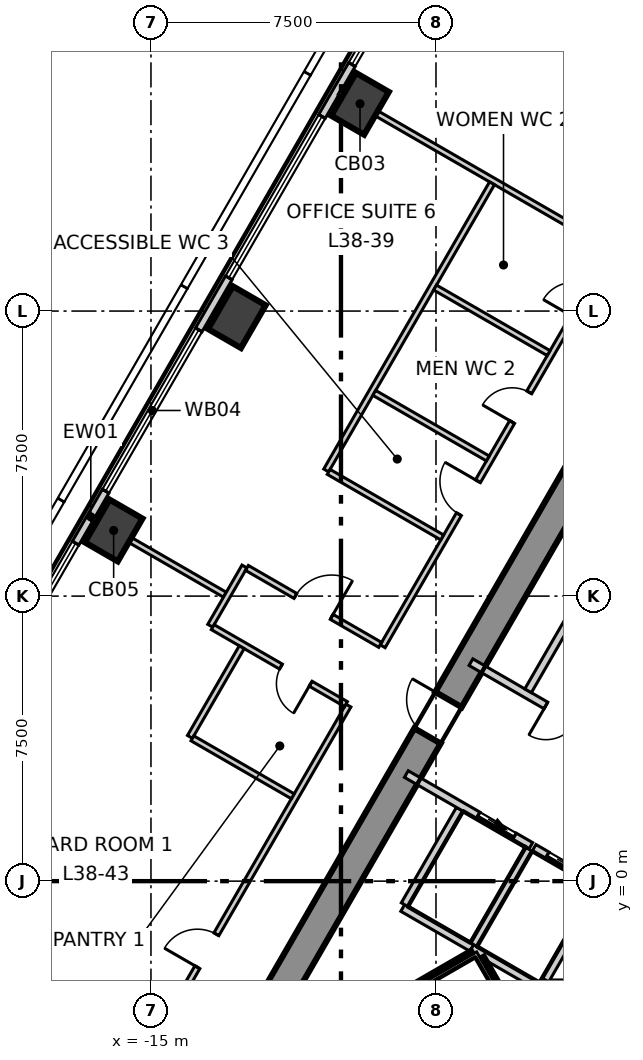
"""IFC4 building model, lengths in metres.
Left out: names, types, materials, properties, quantities, classifications, styles, units other than length and angle.
Written with IfcOpenShell. Run it as: python <this file> out.ifc"""

import sys

from ifc_helpers import new_model, si_unit, direction, frame, frame_2d, origin, origin_2d, place, context, subcontext, project, spatial, polyline, rectangle, outline, extrude, element, fill, save


model = new_model("IFC4")
c1 = context("Model", 3, precision=1e-05, world=origin(), true_north=direction((0.0, 1.0)))
c2 = subcontext(c1, "Body", "Model", "MODEL_VIEW")
j1 = project(units=[si_unit("LENGTHUNIT", "METRE"), si_unit("PLANEANGLEUNIT", "RADIAN")], contexts=[c1])
p1 = place(None, origin())
s1 = spatial("IfcSite", under=j1, at=p1, CompositionType="ELEMENT")
p2 = place(p1, origin())
s2 = spatial("IfcBuilding", under=s1, at=p2, CompositionType="ELEMENT")
p3 = place(p2, frame((0.0, 0.0, 164.3)))
s3 = spatial("IfcBuildingStorey", under=s2, at=p3, CompositionType="ELEMENT", Elevation=164.3)
p4 = place(p3, frame((-1.674, 14.3, -0.3), z_axis=(0.0, 0.0, 1.0), x_axis=(-0.499995765644, -0.866027848477, 0.0)))
e1 = element("IfcWall", 1, at=p4, inside=s3, PredefinedType="SHEAR", context=c2, shape_type="SweptSolid", body=[
    extrude(outline(polyline([(-0.231, -0.4), (1.732, -0.4), (3.695, -0.4), (5.658, -0.4), (7.621, -0.4), (9.584, -0.4), (11.547, -0.4), (13.51, -0.4), (15.473, -0.4), (17.436, -0.4), (19.399, -0.4), (21.362, -0.4), (23.325, -0.4), (22.863, 0.4), (20.977, 0.4), (19.091, 0.4), (17.205, 0.4), (15.319, 0.4), (13.433, 0.4), (11.547, 0.4), (9.661, 0.4), (7.775, 0.4), (5.889, 0.4), (4.003, 0.4), (2.117, 0.4), (0.231, 0.4), (-0.231, -0.4)])), origin(), (0.0, 0.0, 1.0), 4.0),
])
p5 = place(p4, frame((10.997, 0.0, 0.3)))
e2 = element("IfcOpeningElement", 2, at=p5, cuts=e1, PredefinedType="OPENING", context=c2, shape_type="SweptSolid", body=[
    extrude(rectangle(XDim=1.1, YDim=2.1, at=frame_2d((0.55, 1.05))), frame((0.0, 0.41, 0.0), z_axis=(0.0, -1.0, 0.0), x_axis=(1.0, 0.0, 0.0)), (0.0, 0.0, 1.0), 0.82),
])
for number, where, z_axis, x_axis in (
    (3, (-9.499, 20.454, -0.3), (0.0, 0.0, 1.0), (0.5, 0.866, 0.0)),
    (4, (-12.74, 14.841, -0.3), (0.0, 0.0, 1.0), (0.5, 0.866, 0.0)),
    (5, (-15.982, 9.227, -0.3), (0.0, 0.0, 1.0), (0.5, 0.866, 0.0)),
):
    element("IfcColumn", number, at=place(p3, frame(where, z_axis=z_axis, x_axis=x_axis)), inside=s3, PredefinedType="COLUMN", context=c2, shape_type="SweptSolid", body=[
        extrude(rectangle(XDim=1.3, YDim=1.0, at=origin_2d()), origin(), (0.0, 0.0, 1.0), 4.0),
    ])
p6 = place(p3, frame((-2.972, 33.16, 0.0), z_axis=(0.0, 0.0, 1.0), x_axis=(-0.500009959561, -0.866019653553, 0.0)))
e6 = element("IfcWall", 6, at=p6, inside=s3, PredefinedType="ELEMENTEDWALL", context=c2, shape_type="SweptSolid", body=[
    extrude(rectangle(XDim=54.443, YDim=0.2, at=frame_2d((27.222, 0.0))), origin(), (0.0, 0.0, 1.0), 3.7),
])
p7 = place(p6, frame((2.094, 0.0, 0.9)))
e7 = element("IfcOpeningElement", 7, at=p7, cuts=e6, PredefinedType="OPENING", context=c2, shape_type="SweptSolid", body=[
    extrude(rectangle(XDim=4.9, YDim=2.5, at=frame_2d((2.45, 1.25))), frame((0.0, 0.11, 0.0), z_axis=(0.0, -1.0, 0.0), x_axis=(1.0, 0.0, 0.0)), (0.0, 0.0, 1.0), 0.22),
])
p8 = place(p6, frame((8.576, 0.0, 0.9)))
e8 = element("IfcOpeningElement", 8, at=p8, cuts=e6, PredefinedType="OPENING", context=c2, shape_type="SweptSolid", body=[
    extrude(rectangle(XDim=4.9, YDim=2.5, at=frame_2d((2.45, 1.25))), frame((0.0, 0.11, 0.0), z_axis=(0.0, -1.0, 0.0), x_axis=(1.0, 0.0, 0.0)), (0.0, 0.0, 1.0), 0.22),
])
p9 = place(p6, frame((15.058, 0.0, 0.9)))
e9 = element("IfcOpeningElement", 9, at=p9, cuts=e6, PredefinedType="OPENING", context=c2, shape_type="SweptSolid", body=[
    extrude(rectangle(XDim=4.9, YDim=2.5, at=frame_2d((2.45, 1.25))), frame((0.0, 0.11, 0.0), z_axis=(0.0, -1.0, 0.0), x_axis=(1.0, 0.0, 0.0)), (0.0, 0.0, 1.0), 0.22),
])
p10 = place(p6, frame((21.54, 0.0, 0.9)))
e10 = element("IfcOpeningElement", 10, at=p10, cuts=e6, PredefinedType="OPENING", context=c2, shape_type="SweptSolid", body=[
    extrude(rectangle(XDim=4.9, YDim=2.5, at=frame_2d((2.45, 1.25))), frame((0.0, 0.11, 0.0), z_axis=(0.0, -1.0, 0.0), x_axis=(1.0, 0.0, 0.0)), (0.0, 0.0, 1.0), 0.22),
])
p11 = place(p6, frame((28.022, 0.0, 0.9)))
e11 = element("IfcOpeningElement", 11, at=p11, cuts=e6, PredefinedType="OPENING", context=c2, shape_type="SweptSolid", body=[
    extrude(rectangle(XDim=4.9, YDim=2.5, at=frame_2d((2.45, 1.25))), frame((0.0, 0.11, 0.0), z_axis=(0.0, -1.0, 0.0), x_axis=(1.0, 0.0, 0.0)), (0.0, 0.0, 1.0), 0.22),
])
p12 = place(p6, frame((34.505, 0.0, 0.9)))
e12 = element("IfcOpeningElement", 12, at=p12, cuts=e6, PredefinedType="OPENING", context=c2, shape_type="SweptSolid", body=[
    extrude(rectangle(XDim=4.9, YDim=2.5, at=frame_2d((2.45, 1.25))), frame((0.0, 0.11, 0.0), z_axis=(0.0, -1.0, 0.0), x_axis=(1.0, 0.0, 0.0)), (0.0, 0.0, 1.0), 0.22),
])
p13 = place(p6, frame((40.987, 0.0, 0.9)))
e13 = element("IfcOpeningElement", 13, at=p13, cuts=e6, PredefinedType="OPENING", context=c2, shape_type="SweptSolid", body=[
    extrude(rectangle(XDim=4.9, YDim=2.5, at=frame_2d((2.45, 1.25))), frame((0.0, 0.11, 0.0), z_axis=(0.0, -1.0, 0.0), x_axis=(1.0, 0.0, 0.0)), (0.0, 0.0, 1.0), 0.22),
])
p14 = place(p6, frame((47.469, 0.0, 0.9)))
e14 = element("IfcOpeningElement", 14, at=p14, cuts=e6, PredefinedType="OPENING", context=c2, shape_type="SweptSolid", body=[
    extrude(rectangle(XDim=4.9, YDim=2.5, at=frame_2d((2.45, 1.25))), frame((0.0, 0.11, 0.0), z_axis=(0.0, -1.0, 0.0), x_axis=(1.0, 0.0, 0.0)), (0.0, 0.0, 1.0), 0.22),
])
p15 = place(p3, frame((-23.001, -1.69, 0.0), z_axis=(0.0, 0.0, 1.0), x_axis=(0.866010060309, -0.500026574738, 0.0)))
e15 = element("IfcWall", 15, at=p15, inside=s3, PredefinedType="PARTITIONING", context=c2, shape_type="SweptSolid", body=[
    extrude(rectangle(XDim=8.2, YDim=0.15, at=frame_2d((4.1, 0.0))), origin(), (0.0, 0.0, 1.0), 3.7),
])
p16 = place(p3, frame((-18.631, -10.669, 0.0), z_axis=(0.0, 0.0, 1.0), x_axis=(0.500000173646, 0.86602530353, 0.0)))
e16 = element("IfcWall", 16, at=p16, inside=s3, PredefinedType="PARTITIONING", context=c2, shape_type="SweptSolid", body=[
    extrude(rectangle(XDim=17.654, YDim=0.15, at=frame_2d((8.827, 0.0))), origin(), (0.0, 0.0, 1.0), 3.7),
])
p17 = place(p16, frame((9.705, 0.0, 0.0)))
e17 = element("IfcOpeningElement", 17, at=p17, cuts=e16, PredefinedType="OPENING", context=c2, shape_type="SweptSolid", body=[
    extrude(rectangle(XDim=1.0, YDim=2.1, at=frame_2d((0.5, 1.05))), frame((0.0, 0.085, 0.0), z_axis=(0.0, -1.0, 0.0), x_axis=(1.0, 0.0, 0.0)), (0.0, 0.0, 1.0), 0.17),
])
p18 = place(p16, frame((2.141, 0.0, 0.0)))
e18 = element("IfcOpeningElement", 18, at=p18, cuts=e16, PredefinedType="OPENING", context=c2, shape_type="SweptSolid", body=[
    extrude(rectangle(XDim=1.1, YDim=2.1, at=frame_2d((0.55, 1.05))), frame((0.0, 0.085, 0.0), z_axis=(0.0, -1.0, 0.0), x_axis=(1.0, 0.0, 0.0)), (0.0, 0.0, 1.0), 0.17),
])
p19 = place(p3, frame((-8.903, 6.18, 0.0), z_axis=(0.0, 0.0, 1.0), x_axis=(0.500010074151, 0.866019587393, 0.0)))
e19 = element("IfcWall", 19, at=p19, inside=s3, PredefinedType="PARTITIONING", context=c2, shape_type="SweptSolid", body=[
    extrude(rectangle(XDim=17.806, YDim=0.15, at=frame_2d((8.903, 0.0))), origin(), (0.0, 0.0, 1.0), 3.7),
])
p20 = place(p19, frame((14.356, 0.0, 0.0)))
e20 = element("IfcOpeningElement", 20, at=p20, cuts=e19, PredefinedType="OPENING", context=c2, shape_type="SweptSolid", body=[
    extrude(rectangle(XDim=1.1, YDim=2.1, at=frame_2d((0.55, 1.05))), frame((0.0, 0.085, 0.0), z_axis=(0.0, -1.0, 0.0), x_axis=(1.0, 0.0, 0.0)), (0.0, 0.0, 1.0), 0.17),
])
p21 = place(p19, frame((10.014, 0.0, 0.0)))
e21 = element("IfcOpeningElement", 21, at=p21, cuts=e19, PredefinedType="OPENING", context=c2, shape_type="SweptSolid", body=[
    extrude(rectangle(XDim=0.9, YDim=2.1, at=frame_2d((0.45, 1.05))), frame((0.0, 0.085, 0.0), z_axis=(0.0, -1.0, 0.0), x_axis=(1.0, 0.0, 0.0)), (0.0, 0.0, 1.0), 0.17),
])
p22 = place(p19, frame((6.814, 0.0, 0.0)))
e22 = element("IfcOpeningElement", 22, at=p22, cuts=e19, PredefinedType="OPENING", context=c2, shape_type="SweptSolid", body=[
    extrude(rectangle(XDim=0.9, YDim=2.1, at=frame_2d((0.45, 1.05))), frame((0.0, 0.085, 0.0), z_axis=(0.0, -1.0, 0.0), x_axis=(1.0, 0.0, 0.0)), (0.0, 0.0, 1.0), 0.17),
])
p23 = place(p19, frame((4.014, 0.0, 0.0)))
e23 = element("IfcOpeningElement", 23, at=p23, cuts=e19, PredefinedType="OPENING", context=c2, shape_type="SweptSolid", body=[
    extrude(rectangle(XDim=1.0, YDim=2.1, at=frame_2d((0.5, 1.05))), frame((0.0, 0.085, 0.0), z_axis=(0.0, -1.0, 0.0), x_axis=(1.0, 0.0, 0.0)), (0.0, 0.0, 1.0), 0.17),
])
p24 = place(p3, frame((-16.519, 9.537, 0.0), z_axis=(0.0, 0.0, 1.0), x_axis=(0.866026010844, -0.49999894854, 0.0)))
e24 = element("IfcWall", 24, at=p24, inside=s3, PredefinedType="PARTITIONING", context=c2, shape_type="SweptSolid", body=[
    extrude(rectangle(XDim=4.0, YDim=0.15, at=frame_2d((2.0, 0.0))), origin(), (0.0, 0.0, 1.0), 3.2),
])
p25 = place(p3, frame((-13.44, 6.72, 0.0), z_axis=(0.0, 0.0, 1.0), x_axis=(0.499902469156, 0.866081705922, 0.0)))
e25 = element("IfcWall", 25, at=p25, inside=s3, PredefinedType="PARTITIONING", context=c2, shape_type="SweptSolid", body=[
    extrude(rectangle(XDim=1.8, YDim=0.15, at=frame_2d((0.9, 0.0))), origin(), (0.0, 0.0, 1.0), 3.7),
])
p26 = place(p3, frame((-12.475, 8.242, 0.0), z_axis=(0.0, 0.0, 1.0), x_axis=(0.865955608197, -0.500120870022, 0.0)))
e26 = element("IfcWall", 26, at=p26, inside=s3, PredefinedType="PARTITIONING", context=c2, shape_type="SweptSolid", body=[
    extrude(rectangle(XDim=4.049, YDim=0.15, at=frame_2d((2.024, 0.0))), origin(), (0.0, 0.0, 1.0), 3.7),
])
p27 = place(p26, frame((1.475, 0.0, 0.0)))
e27 = element("IfcOpeningElement", 27, at=p27, cuts=e26, PredefinedType="OPENING", context=c2, shape_type="SweptSolid", body=[
    extrude(rectangle(XDim=1.1, YDim=2.1, at=frame_2d((0.55, 1.05))), frame((0.0, 0.085, 0.0), z_axis=(0.0, -1.0, 0.0), x_axis=(1.0, 0.0, 0.0)), (0.0, 0.0, 1.0), 0.17),
])
p28 = place(p3, frame((-13.375, 6.683, 0.0), z_axis=(0.0, 0.0, 1.0), x_axis=(0.865929493314, -0.500166085025, 0.0)))
e28 = element("IfcWall", 28, at=p28, inside=s3, PredefinedType="PARTITIONING", context=c2, shape_type="SweptSolid", body=[
    extrude(rectangle(XDim=4.049, YDim=0.15, at=frame_2d((2.024, 0.0))), origin(), (0.0, 0.0, 1.0), 3.7),
])
p29 = place(p28, frame((2.075, 0.0, 0.0)))
e29 = element("IfcOpeningElement", 29, at=p29, cuts=e28, PredefinedType="OPENING", context=c2, shape_type="SweptSolid", body=[
    extrude(rectangle(XDim=0.9, YDim=2.1, at=frame_2d((0.45, 1.05))), frame((0.0, 0.085, 0.0), z_axis=(0.0, -1.0, 0.0), x_axis=(1.0, 0.0, 0.0)), (0.0, 0.0, 1.0), 0.17),
])
p30 = place(p3, frame((-13.974, 3.796, 0.0), z_axis=(0.0, 0.0, 1.0), x_axis=(0.500004325324, 0.866022906543, 0.0)))
e30 = element("IfcWall", 30, at=p30, inside=s3, PredefinedType="PARTITIONING", context=c2, shape_type="SweptSolid", body=[
    extrude(rectangle(XDim=2.724, YDim=0.15, at=frame_2d((1.362, 0.0))), origin(), (0.0, 0.0, 1.0), 3.7),
])
p31 = place(p3, frame((-13.909, 3.758, 0.0), z_axis=(0.0, 0.0, 1.0), x_axis=(0.865962925632, -0.500108199725, 0.0)))
e31 = element("IfcWall", 31, at=p31, inside=s3, PredefinedType="PARTITIONING", context=c2, shape_type="SweptSolid", body=[
    extrude(rectangle(XDim=3.05, YDim=0.15, at=frame_2d((1.525, 0.0))), origin(), (0.0, 0.0, 1.0), 3.7),
])
p32 = place(p3, frame((-10.036, 20.764, 0.0), z_axis=(0.0, 0.0, 1.0), x_axis=(0.866037308103, -0.499979380549, 0.0)))
e32 = element("IfcWall", 32, at=p32, inside=s3, PredefinedType="PARTITIONING", context=c2, shape_type="SweptSolid", body=[
    extrude(rectangle(XDim=8.198, YDim=0.15, at=frame_2d((4.099, 0.0))), origin(), (0.0, 0.0, 1.0), 3.7),
])
p33 = place(p3, frame((-10.389, 10.806, 0.0), z_axis=(0.0, 0.0, 1.0), x_axis=(0.500042162787, 0.86600105972, 0.0)))
e33 = element("IfcWall", 33, at=p33, inside=s3, PredefinedType="PARTITIONING", context=c2, shape_type="SweptSolid", body=[
    extrude(rectangle(XDim=8.725, YDim=0.15, at=frame_2d((4.363, 0.0))), origin(), (0.0, 0.0, 1.0), 3.7),
])
for number, where, z_axis, x_axis in (
    (34, (-10.324, 10.769, 0.0), (0.0, 0.0, 1.0), (0.866, -0.5, 0.0)),
    (35, (-9.124, 12.847, 0.0), (0.0, 0.0, 1.0), (0.866, -0.5, 0.0)),
    (36, (-7.524, 15.619, 0.0), (0.0, 0.0, 1.0), (0.866, -0.5, 0.0)),
):
    element("IfcWall", number, at=place(p3, frame(where, z_axis=z_axis, x_axis=x_axis)), inside=s3, PredefinedType="PARTITIONING", context=c2, shape_type="SweptSolid", body=[
        extrude(rectangle(XDim=3.45, YDim=0.15, at=frame_2d((1.725, 0.0))), origin(), (0.0, 0.0, 1.0), 3.7),
    ])
p34 = place(p3, frame((-8.376, -0.707, 0.0), z_axis=(0.0, 0.0, 1.0), x_axis=(0.866067520717, -0.499927044236, 0.0)))
e37 = element("IfcWall", 37, at=p34, inside=s3, PredefinedType="SOLIDWALL", context=c2, shape_type="SweptSolid", body=[
    extrude(rectangle(XDim=2.1, YDim=0.2, at=frame_2d((1.05, 0.0))), origin(), (0.0, 0.0, 1.0), 3.7),
])
p35 = place(p3, frame((-8.326, -0.62, 0.0), z_axis=(0.0, 0.0, 1.0), x_axis=(0.500023687443, 0.866011727401, 0.0)))
e38 = element("IfcWall", 38, at=p35, inside=s3, PredefinedType="SOLIDWALL", context=c2, shape_type="SweptSolid", body=[
    extrude(rectangle(XDim=2.9, YDim=0.2, at=frame_2d((1.45, 0.0))), origin(), (0.0, 0.0, 1.0), 3.7),
])
p36 = place(p3, frame((-4.676, -2.7, 0.0), z_axis=(0.0, 0.0, 1.0), x_axis=(1.0, 0.0, 0.0)))
e39 = element("IfcWall", 39, at=p36, inside=s3, PredefinedType="SOLIDWALL", context=c2, shape_type="SweptSolid", body=[
    extrude(rectangle(XDim=2.873, YDim=0.2, at=frame_2d((1.437, 0.0))), origin(), (0.0, 0.0, 1.0), 3.7),
])
p37 = place(p36, frame((0.937, 0.0, 0.0)))
e40 = element("IfcOpeningElement", 40, at=p37, cuts=e39, PredefinedType="OPENING", context=c2, shape_type="SweptSolid", body=[
    extrude(rectangle(XDim=1.1, YDim=2.1, at=frame_2d((0.55, 1.05))), frame((0.0, 0.11, 0.0), z_axis=(0.0, -1.0, 0.0), x_axis=(1.0, 0.0, 0.0)), (0.0, 0.0, 1.0), 0.22),
])
p38 = place(p3, frame((-8.28, 2.818, 0.0), z_axis=(0.0, 0.0, 1.0), x_axis=(0.86600175068, -0.50004096614, 0.0)))
e41 = element("IfcWall", 41, at=p38, inside=s3, PredefinedType="SOLIDWALL", context=c2, shape_type="SweptSolid", body=[
    extrude(rectangle(XDim=3.782, YDim=0.2, at=frame_2d((1.891, 0.0))), origin(), (0.0, 0.0, 1.0), 3.7),
])
p39 = place(p38, frame((2.18, 0.0, 0.0)))
e42 = element("IfcOpeningElement", 42, at=p39, cuts=e41, PredefinedType="OPENING", context=c2, shape_type="SweptSolid", body=[
    extrude(rectangle(XDim=1.1, YDim=2.1, at=frame_2d((0.55, 1.05))), frame((0.0, 0.11, 0.0), z_axis=(0.0, -1.0, 0.0), x_axis=(1.0, 0.0, 0.0)), (0.0, 0.0, 1.0), 0.22),
])
p40 = place(p3, frame((-6.58, 5.762, 0.0), z_axis=(0.0, 0.0, 1.0), x_axis=(0.866029704776, -0.49999255039, 0.0)))
e43 = element("IfcWall", 43, at=p40, inside=s3, PredefinedType="SOLIDWALL", context=c2, shape_type="SweptSolid", body=[
    extrude(rectangle(XDim=3.782, YDim=0.2, at=frame_2d((1.891, 0.0))), origin(), (0.0, 0.0, 1.0), 3.7),
])
p41 = place(p40, frame((2.279, 0.0, 0.0)))
e44 = element("IfcOpeningElement", 44, at=p41, cuts=e43, PredefinedType="OPENING", context=c2, shape_type="SweptSolid", body=[
    extrude(rectangle(XDim=0.9, YDim=2.1, at=frame_2d((0.45, 1.05))), frame((0.0, 0.11, 0.0), z_axis=(0.0, -1.0, 0.0), x_axis=(1.0, 0.0, 0.0)), (0.0, 0.0, 1.0), 0.22),
])
p42 = place(p3, frame((-5.076, 5.009, 0.0), z_axis=(0.0, 0.0, 1.0), x_axis=(0.50002537861, 0.866010750942, 0.0)))
e45 = element("IfcWall", 45, at=p42, inside=s3, PredefinedType="SOLIDWALL", context=c2, shape_type="SweptSolid", body=[
    extrude(rectangle(XDim=3.0, YDim=0.2, at=frame_2d((1.5, 0.0))), origin(), (0.0, 0.0, 1.0), 3.7),
])
p43 = place(p3, frame((-6.557, -1.757, 0.0), z_axis=(0.0, 0.0, 1.0), x_axis=(0.8659754619, -0.500086491905, 0.0)))
e46 = element("IfcWall", 46, at=p43, inside=s3, PredefinedType="SOLIDWALL", context=c2, shape_type="SweptSolid", body=[
    extrude(rectangle(XDim=1.916, YDim=0.2, at=frame_2d((0.958, 0.0))), origin(), (0.0, 0.0, 1.0), 3.7),
])
p44 = place(p3, frame((-6.507, -1.67, 0.0), z_axis=(0.0, 0.0, 1.0), x_axis=(0.50012328804, 0.865954211699, 0.0)))
e47 = element("IfcWall", 47, at=p44, inside=s3, PredefinedType="SOLIDWALL", context=c2, shape_type="SweptSolid", body=[
    extrude(rectangle(XDim=2.9, YDim=0.2, at=frame_2d((1.45, 0.0))), origin(), (0.0, 0.0, 1.0), 3.7),
])
p45 = place(p3, frame((-4.92, 0.878, 0.0), z_axis=(0.0, 0.0, 1.0), x_axis=(0.866010750942, -0.50002537861, 0.0)))
e48 = element("IfcWall", 48, at=p45, inside=s3, PredefinedType="SOLIDWALL", context=c2, shape_type="SweptSolid", body=[
    extrude(rectangle(XDim=2.0, YDim=0.2, at=frame_2d((1.0, 0.0))), origin(), (0.0, 0.0, 1.0), 3.7),
])
p46 = place(p45, frame((0.4, 0.0, 0.0)))
e49 = element("IfcOpeningElement", 49, at=p46, cuts=e48, PredefinedType="OPENING", context=c2, shape_type="SweptSolid", body=[
    extrude(rectangle(XDim=1.1, YDim=2.1, at=frame_2d((0.55, 1.05))), frame((0.0, 0.11, 0.0), z_axis=(0.0, -1.0, 0.0), x_axis=(1.0, 0.0, 0.0)), (0.0, 0.0, 1.0), 0.22),
])
p47 = place(p3, frame((-4.619, -2.6, 0.0), z_axis=(0.0, 0.0, 1.0), x_axis=(0.50009492287, 0.865970593103, 0.0)))
e50 = element("IfcWall", 50, at=p47, inside=s3, PredefinedType="SOLIDWALL", context=c2, shape_type="SweptSolid", body=[
    extrude(rectangle(XDim=2.761, YDim=0.2, at=frame_2d((1.381, 0.0))), origin(), (0.0, 0.0, 1.0), 3.7),
])
p48 = place(p3, frame((-13.167, -5.754, 0.0), z_axis=(0.0, 0.0, 1.0), x_axis=(0.866060938598, 0.499938446846, 0.0)))
e51 = element("IfcWall", 51, at=p48, inside=s3, PredefinedType="SOLIDWALL", context=c2, shape_type="SweptSolid", body=[
    extrude(rectangle(XDim=7.665, YDim=0.2, at=frame_2d((3.832, 0.0))), origin(), (0.0, 0.0, 1.0), 3.7),
])
p49 = place(p3, frame((-6.329, -2.038, 0.0), z_axis=(0.0, 0.0, 1.0), x_axis=(0.500200581029, -0.865909567298, 0.0)))
e52 = element("IfcWall", 52, at=p49, inside=s3, PredefinedType="SOLIDWALL", context=c2, shape_type="SweptSolid", body=[
    extrude(rectangle(XDim=2.799, YDim=0.2, at=frame_2d((1.399, 0.0))), origin(), (0.0, 0.0, 1.0), 3.7),
])
p50 = place(p8, origin())
e53 = element("IfcWindow", 53, at=p50, inside=s3, PartitioningType="SINGLE_PANEL", PredefinedType="WINDOW", context=c2, shape_type="SweptSolid", body=[
    extrude(rectangle(XDim=4.9, YDim=2.5, at=frame_2d((2.45, 1.25))), frame((0.0, 0.03, 0.0), z_axis=(0.0, -1.0, 0.0), x_axis=(1.0, 0.0, 0.0)), (0.0, 0.0, 1.0), 0.06),
])
fill(e8, e53)
p51 = place(p9, origin())
e54 = element("IfcWindow", 54, at=p51, inside=s3, PartitioningType="SINGLE_PANEL", PredefinedType="WINDOW", context=c2, shape_type="SweptSolid", body=[
    extrude(rectangle(XDim=4.9, YDim=2.5, at=frame_2d((2.45, 1.25))), frame((0.0, 0.03, 0.0), z_axis=(0.0, -1.0, 0.0), x_axis=(1.0, 0.0, 0.0)), (0.0, 0.0, 1.0), 0.06),
])
fill(e9, e54)
p52 = place(p10, origin())
e55 = element("IfcWindow", 55, at=p52, inside=s3, PartitioningType="SINGLE_PANEL", PredefinedType="WINDOW", context=c2, shape_type="SweptSolid", body=[
    extrude(rectangle(XDim=4.9, YDim=2.5, at=frame_2d((2.45, 1.25))), frame((0.0, 0.03, 0.0), z_axis=(0.0, -1.0, 0.0), x_axis=(1.0, 0.0, 0.0)), (0.0, 0.0, 1.0), 0.06),
])
fill(e10, e55)
p53 = place(p11, origin())
e56 = element("IfcWindow", 56, at=p53, inside=s3, PartitioningType="SINGLE_PANEL", PredefinedType="WINDOW", context=c2, shape_type="SweptSolid", body=[
    extrude(rectangle(XDim=4.9, YDim=2.5, at=frame_2d((2.45, 1.25))), frame((0.0, 0.03, 0.0), z_axis=(0.0, -1.0, 0.0), x_axis=(1.0, 0.0, 0.0)), (0.0, 0.0, 1.0), 0.06),
])
fill(e11, e56)
p54 = place(p46, origin())
e57 = element("IfcDoor", 57, at=p54, inside=s3, OperationType="SLIDING_TO_LEFT", PredefinedType="DOOR", context=c2, shape_type="SweptSolid", body=[
    extrude(rectangle(XDim=1.1, YDim=2.1, at=frame_2d((0.55, 1.05))), frame((0.0, 0.025, 0.0), z_axis=(0.0, -1.0, 0.0), x_axis=(1.0, 0.0, 0.0)), (0.0, 0.0, 1.0), 0.05),
])
fill(e49, e57)
p55 = place(p39, origin())
e58 = element("IfcDoor", 58, at=p55, inside=s3, OperationType="SLIDING_TO_LEFT", PredefinedType="DOOR", context=c2, shape_type="SweptSolid", body=[
    extrude(rectangle(XDim=1.1, YDim=2.1, at=frame_2d((0.55, 1.05))), frame((0.0, 0.025, 0.0), z_axis=(0.0, -1.0, 0.0), x_axis=(1.0, 0.0, 0.0)), (0.0, 0.0, 1.0), 0.05),
])
fill(e42, e58)
p56 = place(p41, origin())
e59 = element("IfcDoor", 59, at=p56, inside=s3, OperationType="SINGLE_SWING_LEFT", PredefinedType="DOOR", context=c2, shape_type="SweptSolid", body=[
    extrude(rectangle(XDim=0.9, YDim=2.1, at=frame_2d((0.45, 1.05))), frame((0.0, 0.025, 0.0), z_axis=(0.0, -1.0, 0.0), x_axis=(1.0, 0.0, 0.0)), (0.0, 0.0, 1.0), 0.05),
])
fill(e44, e59)
p57 = place(p27, origin())
e60 = element("IfcDoor", 60, at=p57, inside=s3, OperationType="SINGLE_SWING_LEFT", PredefinedType="DOOR", context=c2, shape_type="SweptSolid", body=[
    extrude(rectangle(XDim=1.1, YDim=2.1, at=frame_2d((0.55, 1.05))), frame((0.0, 0.025, 0.0), z_axis=(0.0, -1.0, 0.0), x_axis=(1.0, 0.0, 0.0)), (0.0, 0.0, 1.0), 0.05),
])
fill(e27, e60)
p58 = place(p22, origin())
e61 = element("IfcDoor", 61, at=p58, inside=s3, OperationType="SINGLE_SWING_RIGHT", PredefinedType="DOOR", context=c2, shape_type="SweptSolid", body=[
    extrude(rectangle(XDim=0.9, YDim=2.1, at=frame_2d((0.45, 1.05))), frame((0.0, 0.025, 0.0), z_axis=(0.0, -1.0, 0.0), x_axis=(1.0, 0.0, 0.0)), (0.0, 0.0, 1.0), 0.05),
])
fill(e22, e61)
p59 = place(p23, origin())
e62 = element("IfcDoor", 62, at=p59, inside=s3, OperationType="SINGLE_SWING_LEFT", PredefinedType="DOOR", context=c2, shape_type="SweptSolid", body=[
    extrude(rectangle(XDim=1.0, YDim=2.1, at=frame_2d((0.5, 1.05))), frame((0.0, 0.025, 0.0), z_axis=(0.0, -1.0, 0.0), x_axis=(1.0, 0.0, 0.0)), (0.0, 0.0, 1.0), 0.05),
])
fill(e23, e62)
p60 = place(p17, origin())
e63 = element("IfcDoor", 63, at=p60, inside=s3, OperationType="SINGLE_SWING_RIGHT", PredefinedType="DOOR", context=c2, shape_type="SweptSolid", body=[
    extrude(rectangle(XDim=1.0, YDim=2.1, at=frame_2d((0.5, 1.05))), frame((0.0, 0.025, 0.0), z_axis=(0.0, -1.0, 0.0), x_axis=(1.0, 0.0, 0.0)), (0.0, 0.0, 1.0), 0.05),
])
fill(e17, e63)
p61 = place(p29, origin())
e64 = element("IfcDoor", 64, at=p61, inside=s3, OperationType="SINGLE_SWING_RIGHT", PredefinedType="DOOR", context=c2, shape_type="SweptSolid", body=[
    extrude(rectangle(XDim=0.9, YDim=2.1, at=frame_2d((0.45, 1.05))), frame((0.0, 0.025, 0.0), z_axis=(0.0, -1.0, 0.0), x_axis=(1.0, 0.0, 0.0)), (0.0, 0.0, 1.0), 0.05),
])
fill(e29, e64)
p62 = place(p5, origin())
e65 = element("IfcDoor", 65, at=p62, inside=s3, OperationType="SINGLE_SWING_LEFT", PredefinedType="DOOR", context=c2, shape_type="SweptSolid", body=[
    extrude(rectangle(XDim=1.1, YDim=2.1, at=frame_2d((0.55, 1.05))), frame((0.0, 0.025, 0.0), z_axis=(0.0, -1.0, 0.0), x_axis=(1.0, 0.0, 0.0)), (0.0, 0.0, 1.0), 0.05),
])
fill(e2, e65)
save(model, sys.argv[1])
